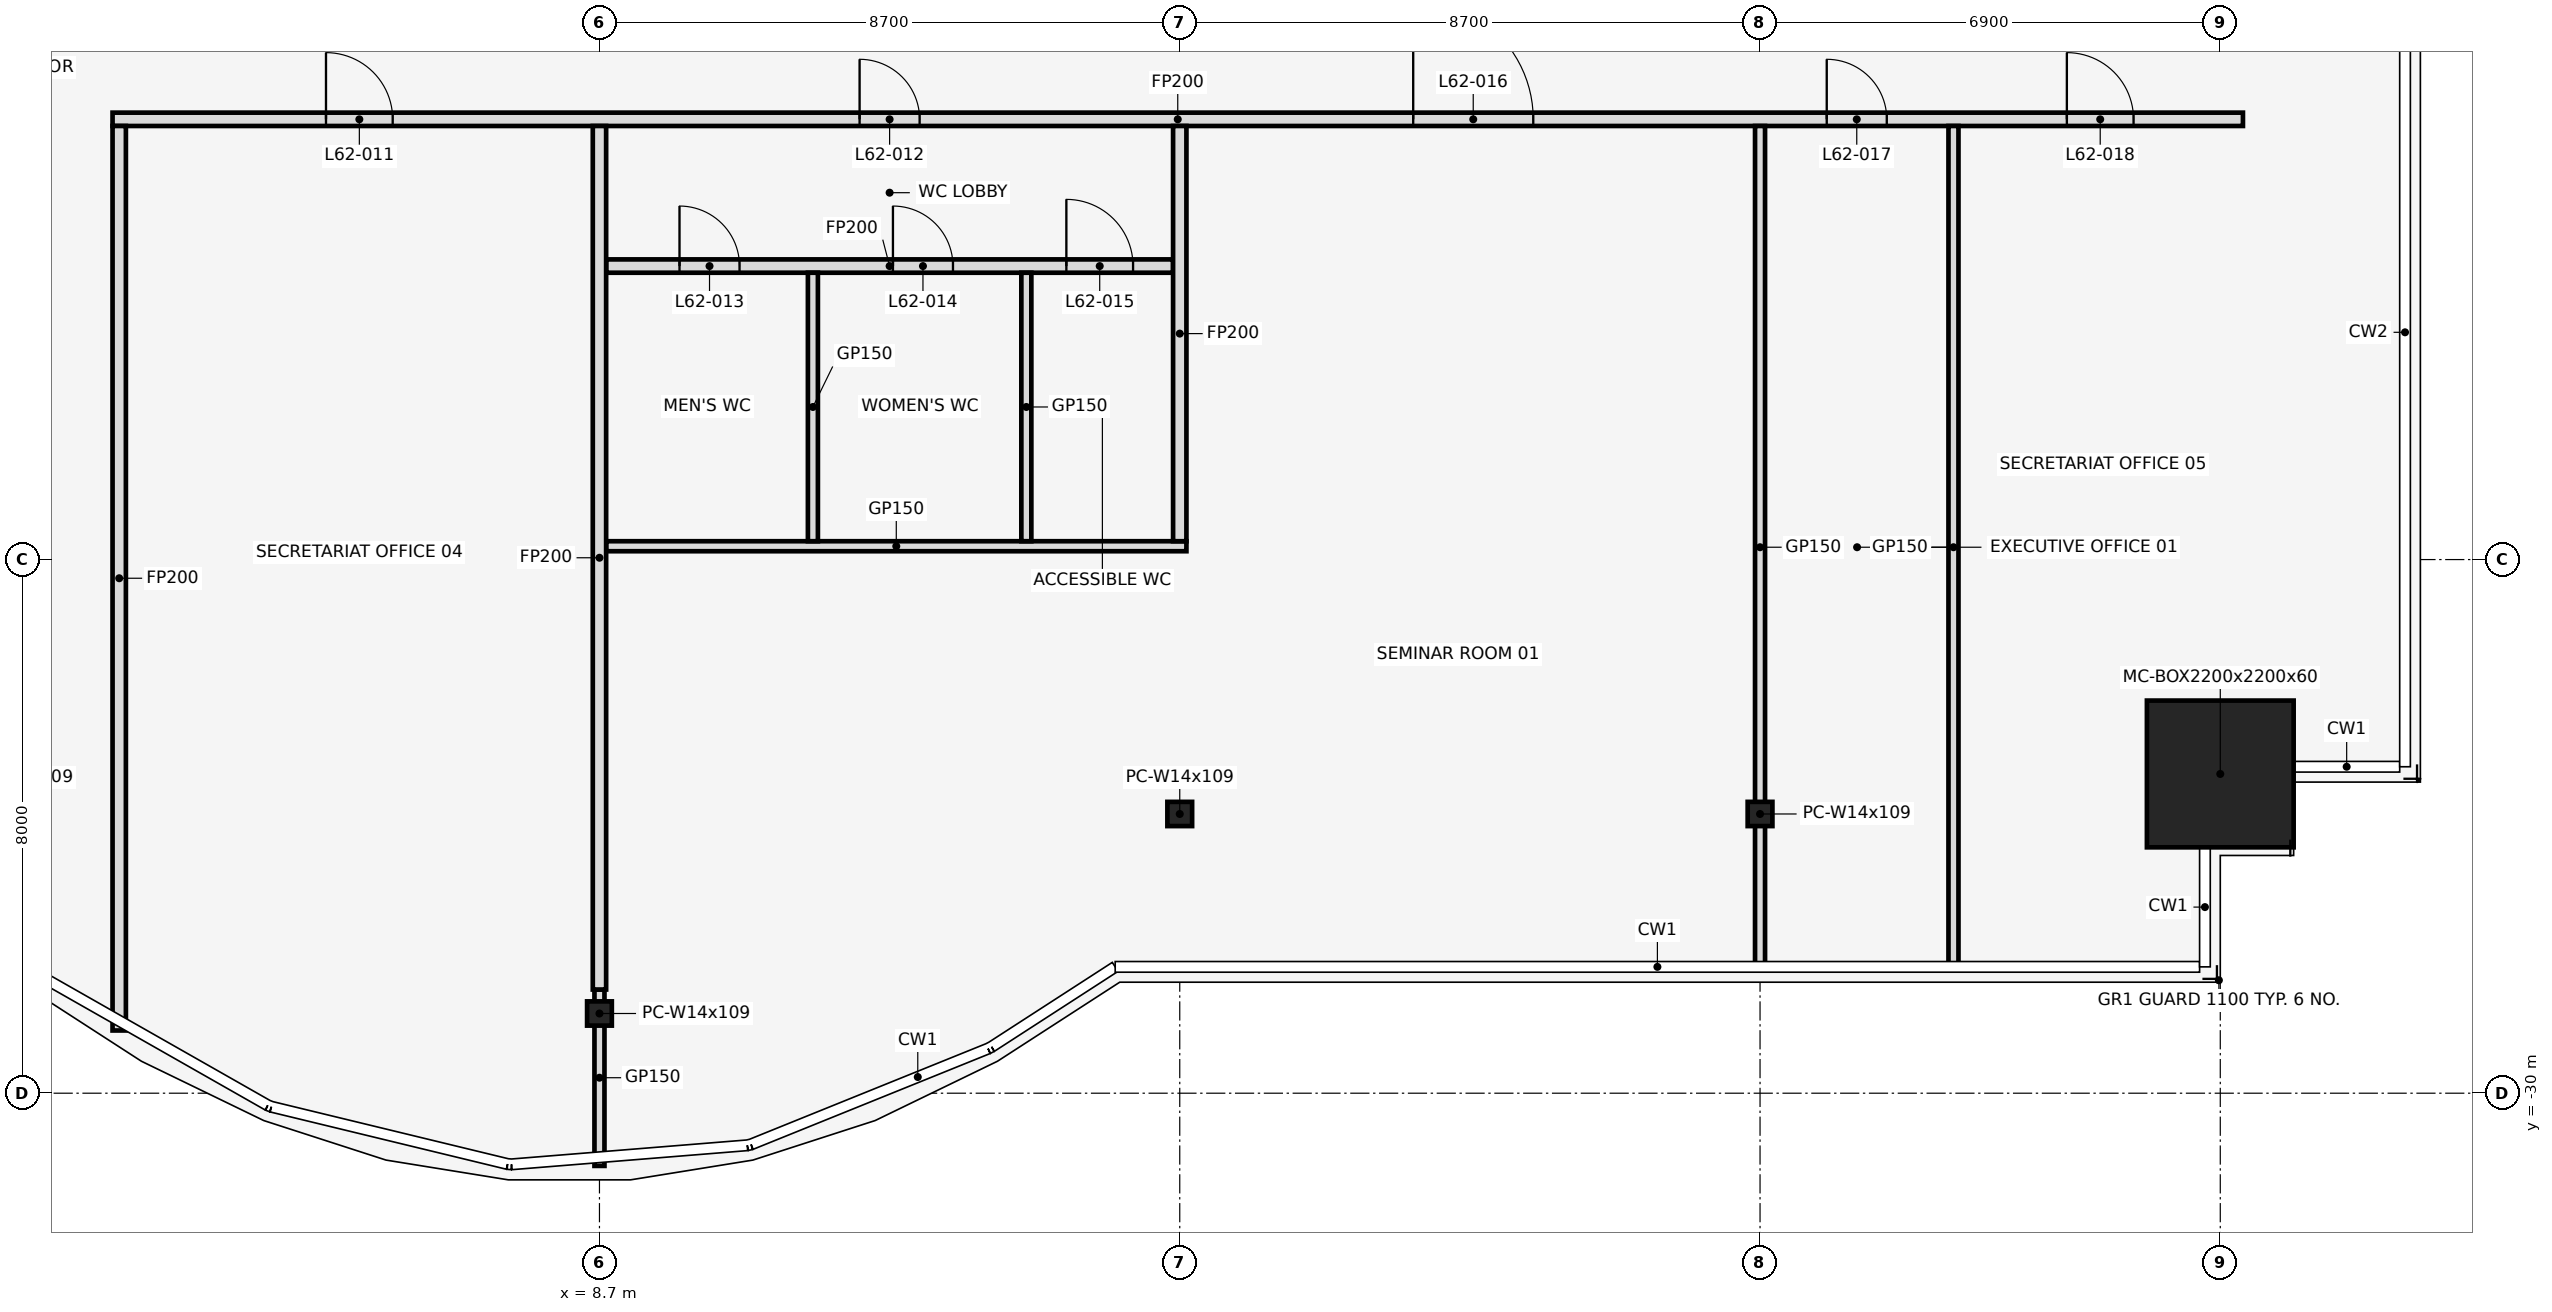
"""IFC4 building model, lengths in metres.
Left out: names, types, materials, properties, quantities, classifications, styles, units other than length and angle.
Written with IfcOpenShell. Run it as: python <this file> out.ifc"""

import sys

from ifc_helpers import new_model, si_unit, direction, frame, frame_2d, origin, origin_2d, place, context, subcontext, project, spatial, rectangle, hollow_rectangle, i_section, extrude, element, fill, save


model = new_model("IFC4")
c1 = context("Model", 3, precision=1e-05, world=origin(), true_north=direction((0.0, 1.0)))
c2 = subcontext(c1, "Body", "Model", "MODEL_VIEW")
j1 = project(units=[si_unit("LENGTHUNIT", "METRE"), si_unit("PLANEANGLEUNIT", "RADIAN")], contexts=[c1])
p1 = place(None, origin())
s1 = spatial("IfcSite", under=j1, at=p1, CompositionType="ELEMENT")
p2 = place(p1, origin())
s2 = spatial("IfcBuilding", under=s1, at=p2, CompositionType="ELEMENT")
p3 = place(p2, frame((0.0, 0.0, 275.0)))
s3 = spatial("IfcBuildingStorey", under=s2, at=p3, CompositionType="ELEMENT", Elevation=275.0)
for number, where, z_axis, x_axis in (
    (1, (8.7, -28.805, 0.0), (0.0, 0.0, 1.0), (1.0, 0.0, 0.0)),
    (2, (17.4, -25.814, 0.0), (0.0, 0.0, 1.0), (1.0, 0.0, 0.0)),
    (3, (26.1, -25.814, 0.0), (0.0, 0.0, 1.0), (1.0, 0.0, 0.0)),
):
    element("IfcColumn", number, at=place(p3, frame(where, z_axis=z_axis, x_axis=x_axis)), inside=s3, PredefinedType="COLUMN", context=c2, shape_type="SweptSolid", body=[
        extrude(i_section(OverallWidth=0.371, OverallDepth=0.363, WebThickness=0.013, FlangeThickness=0.022, at=origin_2d()), origin(), (0.0, 0.0, 1.0), 4.2),
    ])
p4 = place(p3, frame((33.0, -25.214, 0.0), z_axis=(0.0, 0.0, 1.0), x_axis=(1.0, 0.0, 0.0)))
e4 = element("IfcColumn", 4, at=p4, inside=s3, PredefinedType="COLUMN", context=c2, shape_type="SweptSolid", body=[
    extrude(hollow_rectangle(XDim=2.2, YDim=2.2, WallThickness=0.06, at=origin_2d()), origin(), (0.0, 0.0, 1.0), 4.2),
])
p5 = place(p3, frame((8.8, -21.8, 0.0), z_axis=(0.0, 0.0, 1.0), x_axis=(1.0, 0.0, 0.0)))
e5 = element("IfcWall", 5, at=p5, inside=s3, PredefinedType="PARTITIONING", context=c2, shape_type="SweptSolid", body=[
    extrude(rectangle(XDim=8.7, YDim=0.15, at=frame_2d((4.35, 0.0))), origin(), (0.0, 0.0, 1.0), 3.118),
])
p6 = place(p3, frame((8.8, -17.6, 0.0), z_axis=(0.0, 0.0, 1.0), x_axis=(1.0, 0.0, 0.0)))
e6 = element("IfcWall", 6, at=p6, inside=s3, PredefinedType="PARTITIONING", context=c2, shape_type="SweptSolid", body=[
    extrude(rectangle(XDim=8.5, YDim=0.2, at=frame_2d((4.25, 0.0))), origin(), (0.0, 0.0, 1.0), 3.118),
])
p7 = place(p6, frame((1.1, 0.0, 0.0)))
e7 = element("IfcOpeningElement", 7, at=p7, cuts=e6, PredefinedType="OPENING", context=c2, shape_type="SweptSolid", body=[
    extrude(rectangle(XDim=0.9, YDim=2.1, at=frame_2d((0.45, 1.05))), frame((0.0, 0.112, 0.0), z_axis=(0.0, -1.0, 0.0), x_axis=(1.0, 0.0, 0.0)), (0.0, 0.0, 1.0), 0.224),
])
p8 = place(p6, frame((4.3, 0.0, 0.0)))
e8 = element("IfcOpeningElement", 8, at=p8, cuts=e6, PredefinedType="OPENING", context=c2, shape_type="SweptSolid", body=[
    extrude(rectangle(XDim=0.9, YDim=2.1, at=frame_2d((0.45, 1.05))), frame((0.0, 0.112, 0.0), z_axis=(0.0, -1.0, 0.0), x_axis=(1.0, 0.0, 0.0)), (0.0, 0.0, 1.0), 0.224),
])
p9 = place(p6, frame((6.9, 0.0, 0.0)))
e9 = element("IfcOpeningElement", 9, at=p9, cuts=e6, PredefinedType="OPENING", context=c2, shape_type="SweptSolid", body=[
    extrude(rectangle(XDim=1.0, YDim=2.1, at=frame_2d((0.5, 1.05))), frame((0.0, 0.112, 0.0), z_axis=(0.0, -1.0, 0.0), x_axis=(1.0, 0.0, 0.0)), (0.0, 0.0, 1.0), 0.224),
])
p10 = place(p3, frame((1.4, -15.4, 0.0), z_axis=(0.0, 0.0, 1.0), x_axis=(1.0, 0.0, 0.0)))
e10 = element("IfcWall", 10, at=p10, inside=s3, PredefinedType="PARTITIONING", context=c2, shape_type="SweptSolid", body=[
    extrude(rectangle(XDim=31.94, YDim=0.2, at=frame_2d((15.97, 0.0))), origin(), (0.0, 0.0, 1.0), 3.118),
])
p11 = place(p10, frame((3.2, 0.0, 0.0)))
e11 = element("IfcOpeningElement", 11, at=p11, cuts=e10, PredefinedType="OPENING", context=c2, shape_type="SweptSolid", body=[
    extrude(rectangle(XDim=1.0, YDim=2.1, at=frame_2d((0.5, 1.05))), frame((0.0, 0.112, 0.0), z_axis=(0.0, -1.0, 0.0), x_axis=(1.0, 0.0, 0.0)), (0.0, 0.0, 1.0), 0.224),
])
p12 = place(p10, frame((11.2, 0.0, 0.0)))
e12 = element("IfcOpeningElement", 12, at=p12, cuts=e10, PredefinedType="OPENING", context=c2, shape_type="SweptSolid", body=[
    extrude(rectangle(XDim=0.9, YDim=2.1, at=frame_2d((0.45, 1.05))), frame((0.0, 0.112, 0.0), z_axis=(0.0, -1.0, 0.0), x_axis=(1.0, 0.0, 0.0)), (0.0, 0.0, 1.0), 0.224),
])
p13 = place(p10, frame((19.5, 0.0, 0.0)))
e13 = element("IfcOpeningElement", 13, at=p13, cuts=e10, PredefinedType="OPENING", context=c2, shape_type="SweptSolid", body=[
    extrude(rectangle(XDim=1.8, YDim=2.1, at=frame_2d((0.9, 1.05))), frame((0.0, 0.112, 0.0), z_axis=(0.0, -1.0, 0.0), x_axis=(1.0, 0.0, 0.0)), (0.0, 0.0, 1.0), 0.224),
])
p14 = place(p10, frame((25.7, 0.0, 0.0)))
e14 = element("IfcOpeningElement", 14, at=p14, cuts=e10, PredefinedType="OPENING", context=c2, shape_type="SweptSolid", body=[
    extrude(rectangle(XDim=0.9, YDim=2.1, at=frame_2d((0.45, 1.05))), frame((0.0, 0.112, 0.0), z_axis=(0.0, -1.0, 0.0), x_axis=(1.0, 0.0, 0.0)), (0.0, 0.0, 1.0), 0.224),
])
p15 = place(p10, frame((29.3, 0.0, 0.0)))
e15 = element("IfcOpeningElement", 15, at=p15, cuts=e10, PredefinedType="OPENING", context=c2, shape_type="SweptSolid", body=[
    extrude(rectangle(XDim=1.0, YDim=2.1, at=frame_2d((0.5, 1.05))), frame((0.0, 0.112, 0.0), z_axis=(0.0, -1.0, 0.0), x_axis=(1.0, 0.0, 0.0)), (0.0, 0.0, 1.0), 0.224),
])
p16 = place(p3, frame((1.5, -29.06, 0.0), z_axis=(0.0, 0.0, 1.0), x_axis=(0.0, 1.0, 0.0)))
e16 = element("IfcWall", 16, at=p16, inside=s3, PredefinedType="PARTITIONING", context=c2, shape_type="SweptSolid", body=[
    extrude(rectangle(XDim=13.56, YDim=0.2, at=frame_2d((6.78, 0.0))), origin(), (0.0, 0.0, 1.0), 3.118),
])
p17 = place(p3, frame((8.7, -31.09, 0.0), z_axis=(0.0, 0.0, 1.0), x_axis=(0.0, 1.0, 0.0)))
e17 = element("IfcWall", 17, at=p17, inside=s3, PredefinedType="PARTITIONING", context=c2, shape_type="SweptSolid", body=[
    extrude(rectangle(XDim=2.644, YDim=0.15, at=frame_2d((1.322, 0.0))), origin(), (0.0, 0.0, 1.0), 3.118),
])
p18 = place(p3, frame((8.7, -28.446, 0.0), z_axis=(0.0, 0.0, 1.0), x_axis=(0.0, 1.0, 0.0)))
e18 = element("IfcWall", 18, at=p18, inside=s3, PredefinedType="PARTITIONING", context=c2, shape_type="SweptSolid", body=[
    extrude(rectangle(XDim=12.946, YDim=0.2, at=frame_2d((6.473, 0.0))), origin(), (0.0, 0.0, 1.0), 3.118),
])
for number, where, z_axis, x_axis in (
    (19, (11.9, -21.725, 0.0), (0.0, 0.0, 1.0), (0.0, 1.0, 0.0)),
    (20, (15.1, -21.725, 0.0), (0.0, 0.0, 1.0), (0.0, 1.0, 0.0)),
):
    element("IfcWall", number, at=place(p3, frame(where, z_axis=z_axis, x_axis=x_axis)), inside=s3, PredefinedType="PARTITIONING", context=c2, shape_type="SweptSolid", body=[
        extrude(rectangle(XDim=4.025, YDim=0.15, at=frame_2d((2.013, 0.0))), origin(), (0.0, 0.0, 1.0), 3.118),
    ])
p19 = place(p3, frame((17.4, -21.725, 0.0), z_axis=(0.0, 0.0, 1.0), x_axis=(0.0, 1.0, 0.0)))
e21 = element("IfcWall", 21, at=p19, inside=s3, PredefinedType="PARTITIONING", context=c2, shape_type="SweptSolid", body=[
    extrude(rectangle(XDim=6.225, YDim=0.2, at=frame_2d((3.113, 0.0))), origin(), (0.0, 0.0, 1.0), 3.118),
])
for number, where, z_axis, x_axis in (
    (22, (26.1, -28.13, 0.0), (0.0, 0.0, 1.0), (0.0, 1.0, 0.0)),
    (23, (29.0, -28.13, 0.0), (0.0, 0.0, 1.0), (0.0, 1.0, 0.0)),
):
    element("IfcWall", number, at=place(p3, frame(where, z_axis=z_axis, x_axis=x_axis)), inside=s3, PredefinedType="PARTITIONING", context=c2, shape_type="SweptSolid", body=[
        extrude(rectangle(XDim=12.63, YDim=0.15, at=frame_2d((6.315, 0.0))), origin(), (0.0, 0.0, 1.0), 3.118),
    ])
p20 = place(p11, frame((1.0, 0.0, 0.0), z_axis=(0.0, 0.0, 1.0), x_axis=(-1.0, 0.0, 0.0)))
e24 = element("IfcDoor", 24, at=p20, inside=s3, OperationType="SINGLE_SWING_RIGHT", PredefinedType="DOOR", context=c2, shape_type="SweptSolid", body=[
    extrude(rectangle(XDim=1.0, YDim=2.1, at=frame_2d((0.5, 1.05))), frame((0.0, 0.025, 0.0), z_axis=(0.0, -1.0, 0.0), x_axis=(1.0, 0.0, 0.0)), (0.0, 0.0, 1.0), 0.05),
])
fill(e11, e24)
p21 = place(p12, frame((0.9, 0.0, 0.0), z_axis=(0.0, 0.0, 1.0), x_axis=(-1.0, 0.0, 0.0)))
e25 = element("IfcDoor", 25, at=p21, inside=s3, OperationType="SINGLE_SWING_RIGHT", PredefinedType="DOOR", context=c2, shape_type="SweptSolid", body=[
    extrude(rectangle(XDim=0.9, YDim=2.1, at=frame_2d((0.45, 1.05))), frame((0.0, 0.025, 0.0), z_axis=(0.0, -1.0, 0.0), x_axis=(1.0, 0.0, 0.0)), (0.0, 0.0, 1.0), 0.05),
])
fill(e12, e25)
p22 = place(p7, frame((0.9, 0.0, 0.0), z_axis=(0.0, 0.0, 1.0), x_axis=(-1.0, 0.0, 0.0)))
e26 = element("IfcDoor", 26, at=p22, inside=s3, OperationType="SINGLE_SWING_LEFT", PredefinedType="DOOR", context=c2, shape_type="SweptSolid", body=[
    extrude(rectangle(XDim=0.9, YDim=2.1, at=frame_2d((0.45, 1.05))), frame((0.0, 0.025, 0.0), z_axis=(0.0, -1.0, 0.0), x_axis=(1.0, 0.0, 0.0)), (0.0, 0.0, 1.0), 0.05),
])
fill(e7, e26)
p23 = place(p8, frame((0.9, 0.0, 0.0), z_axis=(0.0, 0.0, 1.0), x_axis=(-1.0, 0.0, 0.0)))
e27 = element("IfcDoor", 27, at=p23, inside=s3, OperationType="SINGLE_SWING_RIGHT", PredefinedType="DOOR", context=c2, shape_type="SweptSolid", body=[
    extrude(rectangle(XDim=0.9, YDim=2.1, at=frame_2d((0.45, 1.05))), frame((0.0, 0.025, 0.0), z_axis=(0.0, -1.0, 0.0), x_axis=(1.0, 0.0, 0.0)), (0.0, 0.0, 1.0), 0.05),
])
fill(e8, e27)
p24 = place(p9, frame((1.0, 0.0, 0.0), z_axis=(0.0, 0.0, 1.0), x_axis=(-1.0, 0.0, 0.0)))
e28 = element("IfcDoor", 28, at=p24, inside=s3, OperationType="SINGLE_SWING_RIGHT", PredefinedType="DOOR", context=c2, shape_type="SweptSolid", body=[
    extrude(rectangle(XDim=1.0, YDim=2.1, at=frame_2d((0.5, 1.05))), frame((0.0, 0.025, 0.0), z_axis=(0.0, -1.0, 0.0), x_axis=(1.0, 0.0, 0.0)), (0.0, 0.0, 1.0), 0.05),
])
fill(e9, e28)
p25 = place(p13, origin())
e29 = element("IfcDoor", 29, at=p25, inside=s3, OperationType="SINGLE_SWING_LEFT", PredefinedType="DOOR", context=c2, shape_type="SweptSolid", body=[
    extrude(rectangle(XDim=1.8, YDim=2.1, at=frame_2d((0.9, 1.05))), frame((0.0, 0.025, 0.0), z_axis=(0.0, -1.0, 0.0), x_axis=(1.0, 0.0, 0.0)), (0.0, 0.0, 1.0), 0.05),
])
fill(e13, e29)
p26 = place(p14, frame((0.9, 0.0, 0.0), z_axis=(0.0, 0.0, 1.0), x_axis=(-1.0, 0.0, 0.0)))
e30 = element("IfcDoor", 30, at=p26, inside=s3, OperationType="SINGLE_SWING_RIGHT", PredefinedType="DOOR", context=c2, shape_type="SweptSolid", body=[
    extrude(rectangle(XDim=0.9, YDim=2.1, at=frame_2d((0.45, 1.05))), frame((0.0, 0.025, 0.0), z_axis=(0.0, -1.0, 0.0), x_axis=(1.0, 0.0, 0.0)), (0.0, 0.0, 1.0), 0.05),
])
fill(e14, e30)
p27 = place(p15, frame((1.0, 0.0, 0.0), z_axis=(0.0, 0.0, 1.0), x_axis=(-1.0, 0.0, 0.0)))
e31 = element("IfcDoor", 31, at=p27, inside=s3, OperationType="SINGLE_SWING_RIGHT", PredefinedType="DOOR", context=c2, shape_type="SweptSolid", body=[
    extrude(rectangle(XDim=1.0, YDim=2.1, at=frame_2d((0.5, 1.05))), frame((0.0, 0.025, 0.0), z_axis=(0.0, -1.0, 0.0), x_axis=(1.0, 0.0, 0.0)), (0.0, 0.0, 1.0), 0.05),
])
fill(e15, e31)
save(model, sys.argv[1])
